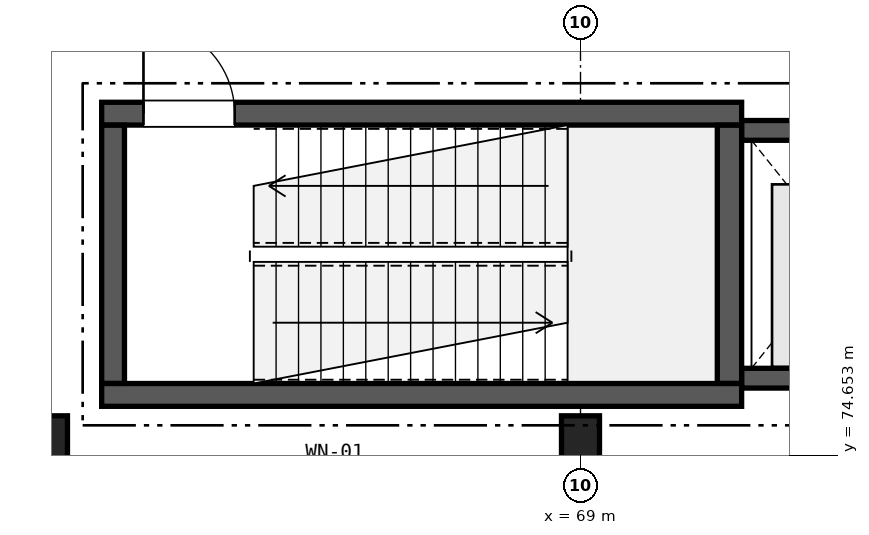
"""IFC4 building model, lengths in metres.
Left out: names, types, materials, properties, quantities, classifications, styles, units other than length and angle.
Written with IfcOpenShell. Run it as: python <this file> out.ifc"""

import sys

from ifc_helpers import new_model, si_unit, direction, frame, frame_2d, origin, origin_2d, place, context, subcontext, project, spatial, rectangle, extrude, element, fill, save


model = new_model("IFC4")
c1 = context("Model", 3, precision=1e-05, world=origin(), true_north=direction((0.0, 1.0)))
c2 = subcontext(c1, "Body", "Model", "MODEL_VIEW")
j1 = project(units=[si_unit("LENGTHUNIT", "METRE"), si_unit("PLANEANGLEUNIT", "RADIAN")], contexts=[c1])
p1 = place(None, origin())
s1 = spatial("IfcSite", under=j1, at=p1, CompositionType="ELEMENT")
p2 = place(p1, origin())
s2 = spatial("IfcBuilding", under=s1, at=p2, CompositionType="ELEMENT")
p3 = place(p2, origin())
s3 = spatial("IfcBuildingStorey", under=s2, at=p3, CompositionType="ELEMENT", Elevation=0.0)
for number, where, z_axis, x_axis in (
    (1, (62.0, 74.8, 0.0), (0.0, 0.0, 1.0), (1.0, 0.0, 0.0)),
    (2, (69.0, 74.8, 0.0), (0.0, 0.0, 1.0), (1.0, 0.0, 0.0)),
):
    element("IfcColumn", number, at=place(p3, frame(where, z_axis=z_axis, x_axis=x_axis)), inside=s3, PredefinedType="COLUMN", context=c2, shape_type="SweptSolid", body=[
        extrude(rectangle(XDim=0.5, YDim=0.75, at=origin_2d()), origin(), (0.0, 0.0, 1.0), 5.1),
    ])
p4 = place(p3, frame((62.7, 75.45, 0.0), z_axis=(0.0, 0.0, 1.0), x_axis=(1.0, 0.0, 0.0)))
e3 = element("IfcWall", 3, at=p4, inside=s3, PredefinedType="SHEAR", context=c2, shape_type="SweptSolid", body=[
    extrude(rectangle(XDim=8.42, YDim=0.3, at=frame_2d((4.21, 0.0))), origin(), (0.0, 0.0, 1.0), 4.81),
])
p5 = place(p3, frame((62.7, 79.15, 0.0), z_axis=(0.0, 0.0, 1.0), x_axis=(1.0, 0.0, 0.0)))
e4 = element("IfcWall", 4, at=p5, inside=s3, PredefinedType="SHEAR", context=c2, shape_type="SweptSolid", body=[
    extrude(rectangle(XDim=8.42, YDim=0.3, at=frame_2d((4.21, 0.0))), origin(), (0.0, 0.0, 1.0), 4.81),
])
p6 = place(p5, frame((0.55, 0.0, 0.0)))
e5 = element("IfcOpeningElement", 5, at=p6, cuts=e4, PredefinedType="OPENING", context=c2, shape_type="SweptSolid", body=[
    extrude(rectangle(XDim=1.2, YDim=2.2, at=frame_2d((0.6, 1.1))), frame((0.0, 0.16, 0.0), z_axis=(0.0, -1.0, 0.0), x_axis=(1.0, 0.0, 0.0)), (0.0, 0.0, 1.0), 0.32),
])
p7 = place(p3, frame((62.85, 75.602, 0.0), z_axis=(0.0, 0.0, 1.0), x_axis=(0.0, 1.0, 0.0)))
e6 = element("IfcWall", 6, at=p7, inside=s3, PredefinedType="SHEAR", context=c2, shape_type="SweptSolid", body=[
    extrude(rectangle(XDim=3.396, YDim=0.3, at=frame_2d((1.698, 0.0))), origin(), (0.0, 0.0, 1.0), 4.81),
])
p8 = place(p3, frame((70.96, 75.602, 0.0), z_axis=(0.0, 0.0, 1.0), x_axis=(0.0, 1.0, 0.0)))
e7 = element("IfcWall", 7, at=p8, inside=s3, PredefinedType="SHEAR", context=c2, shape_type="SweptSolid", body=[
    extrude(rectangle(XDim=3.396, YDim=0.32, at=frame_2d((1.698, 0.0))), origin(), (0.0, 0.0, 1.0), 4.81),
])
p9 = place(p3, frame((71.122, 75.67, 0.0), z_axis=(0.0, 0.0, 1.0), x_axis=(1.0, 0.0, 0.0)))
e8 = element("IfcWall", 8, at=p9, inside=s3, PredefinedType="SHEAR", context=c2, shape_type="SweptSolid", body=[
    extrude(rectangle(XDim=2.658, YDim=0.26, at=frame_2d((1.329, 0.0))), origin(), (0.0, 0.0, 1.0), 4.81),
])
p10 = place(p3, frame((71.122, 78.93, 0.0), z_axis=(0.0, 0.0, 1.0), x_axis=(1.0, 0.0, 0.0)))
e9 = element("IfcWall", 9, at=p10, inside=s3, PredefinedType="SHEAR", context=c2, shape_type="SweptSolid", body=[
    extrude(rectangle(XDim=2.658, YDim=0.26, at=frame_2d((1.329, 0.0))), origin(), (0.0, 0.0, 1.0), 4.81),
])
p11 = place(p10, frame((0.679, 0.0, 0.0)))
e10 = element("IfcOpeningElement", 10, at=p11, cuts=e9, PredefinedType="OPENING", context=c2, shape_type="SweptSolid", body=[
    extrude(rectangle(XDim=1.3, YDim=2.2, at=frame_2d((0.65, 1.1))), frame((0.0, 0.14, 0.0), z_axis=(0.0, -1.0, 0.0), x_axis=(1.0, 0.0, 0.0)), (0.0, 0.0, 1.0), 0.28),
])
p12 = place(p6, origin())
e11 = element("IfcDoor", 11, at=p12, inside=s3, OperationType="SINGLE_SWING_LEFT", PredefinedType="DOOR", context=c2, shape_type="SweptSolid", body=[
    extrude(rectangle(XDim=1.2, YDim=2.2, at=frame_2d((0.6, 1.1))), frame((0.0, 0.025, 0.0), z_axis=(0.0, -1.0, 0.0), x_axis=(1.0, 0.0, 0.0)), (0.0, 0.0, 1.0), 0.05),
])
fill(e5, e11)
save(model, sys.argv[1])
